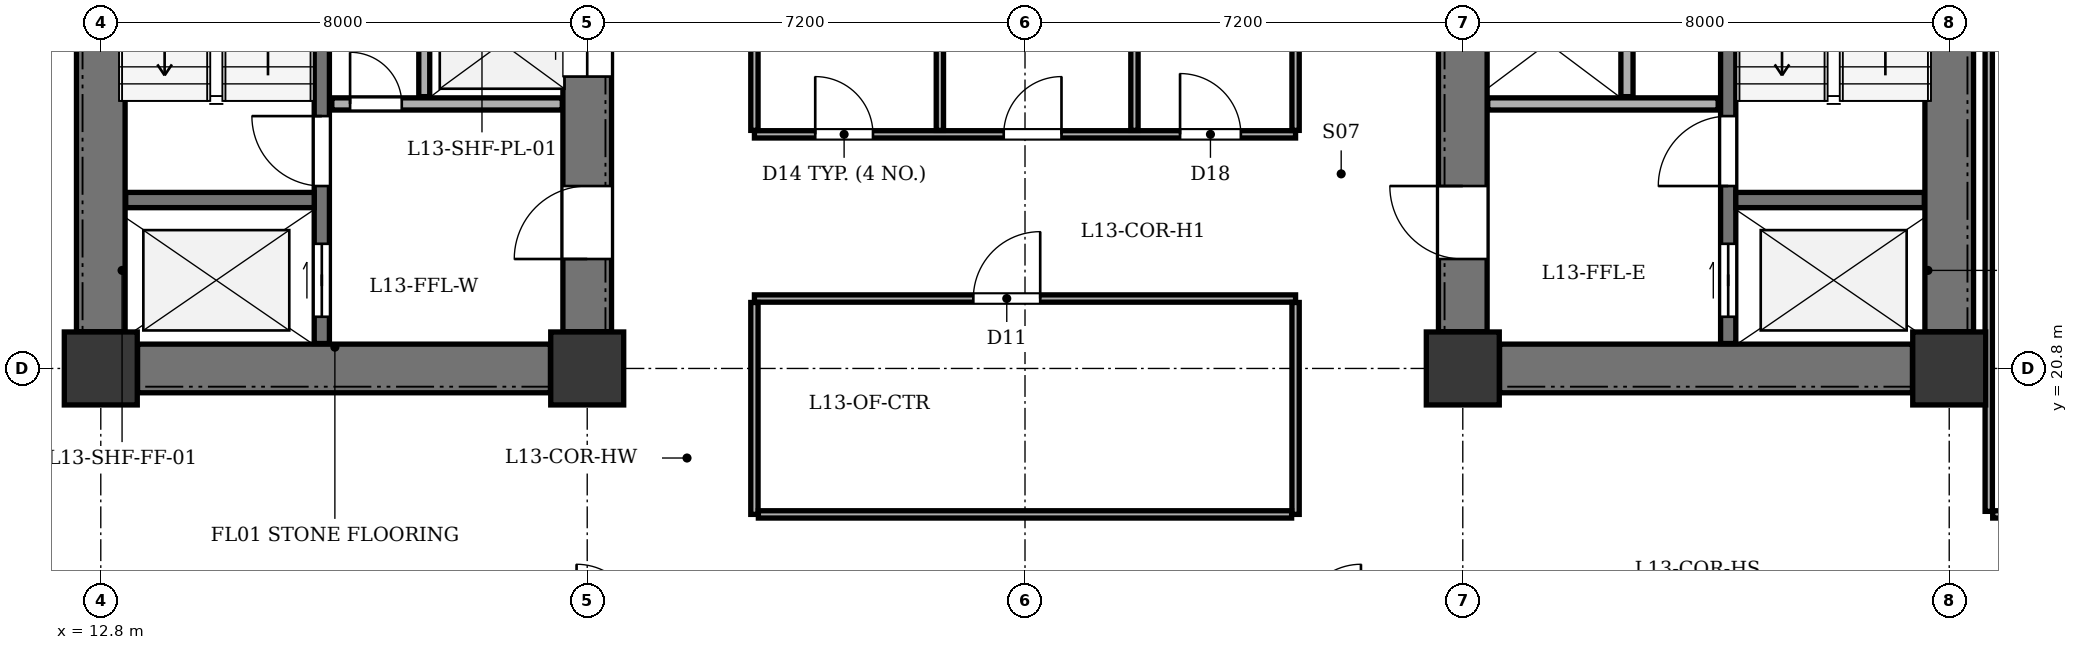
"""IFC4 building model, lengths in metres.
Left out: names, types, materials, properties, quantities, classifications, styles, units other than length and angle.
Written with IfcOpenShell. Run it as: python <this file> out.ifc"""

import sys

from ifc_helpers import new_model, si_unit, direction, frame, frame_2d, origin, origin_2d, place, context, subcontext, project, spatial, rectangle, extrude, element, fill, save


model = new_model("IFC4")
c1 = context("Model", 3, precision=1e-05, world=origin(), true_north=direction((0.0, 1.0)))
c2 = subcontext(c1, "Body", "Model", "MODEL_VIEW")
j1 = project(units=[si_unit("LENGTHUNIT", "METRE"), si_unit("PLANEANGLEUNIT", "RADIAN")], contexts=[c1])
p1 = place(None, origin())
s1 = spatial("IfcSite", under=j1, at=p1, CompositionType="ELEMENT")
p2 = place(p1, origin())
s2 = spatial("IfcBuilding", under=s1, at=p2, CompositionType="ELEMENT")
p3 = place(p2, frame((0.0, 0.0, 55.5)))
s3 = spatial("IfcBuildingStorey", under=s2, at=p3, CompositionType="ELEMENT", Elevation=55.5)
for number, where, z_axis, x_axis in (
    (1, (12.8, 20.8, 0.0), (0.0, 0.0, 1.0), (1.0, 0.0, 0.0)),
    (2, (20.8, 20.8, 0.0), (0.0, 0.0, 1.0), (1.0, 0.0, 0.0)),
    (3, (35.2, 20.8, 0.0), (0.0, 0.0, 1.0), (1.0, 0.0, 0.0)),
    (4, (43.2, 20.8, 0.0), (0.0, 0.0, 1.0), (1.0, 0.0, 0.0)),
):
    element("IfcColumn", number, at=place(p3, frame(where, z_axis=z_axis, x_axis=x_axis)), inside=s3, PredefinedType="COLUMN", context=c2, shape_type="SweptSolid", body=[
        extrude(rectangle(XDim=1.2, YDim=1.2, at=origin_2d()), origin(), (0.0, 0.0, 1.0), 3.9),
    ])
p4 = place(p3, frame((12.8, 21.405, 0.0), z_axis=(0.0, 0.0, 1.0), x_axis=(0.0, 1.0, 0.0)))
e5 = element("IfcWall", 5, at=p4, inside=s3, PredefinedType="SHEAR", context=c2, shape_type="SweptSolid", body=[
    extrude(rectangle(XDim=11.59, YDim=0.8, at=frame_2d((5.795, 0.0))), origin(), (0.0, 0.0, 1.0), 3.6),
])
p5 = place(p3, frame((13.405, 20.8, 0.0), z_axis=(0.0, 0.0, 1.0), x_axis=(1.0, 0.0, 0.0)))
e6 = element("IfcWall", 6, at=p5, inside=s3, PredefinedType="SHEAR", context=c2, shape_type="SweptSolid", body=[
    extrude(rectangle(XDim=6.79, YDim=0.8, at=frame_2d((3.395, 0.0))), origin(), (0.0, 0.0, 1.0), 3.6),
])
p6 = place(p3, frame((20.8, 21.405, 0.0), z_axis=(0.0, 0.0, 1.0), x_axis=(0.0, 1.0, 0.0)))
e7 = element("IfcWall", 7, at=p6, inside=s3, PredefinedType="SHEAR", context=c2, shape_type="SweptSolid", body=[
    extrude(rectangle(XDim=11.59, YDim=0.8, at=frame_2d((5.795, 0.0))), origin(), (0.0, 0.0, 1.0), 3.6),
])
p7 = place(p6, frame((1.195, 0.0, 0.0)))
e8 = element("IfcOpeningElement", 8, at=p7, cuts=e7, PredefinedType="OPENING", context=c2, shape_type="SweptSolid", body=[
    extrude(rectangle(XDim=1.2, YDim=2.15, at=frame_2d((0.6, 1.075))), frame((0.0, 0.41, 0.0), z_axis=(0.0, -1.0, 0.0), x_axis=(1.0, 0.0, 0.0)), (0.0, 0.0, 1.0), 0.82),
])
p8 = place(p6, frame((4.195, 0.0, 0.0)))
e9 = element("IfcOpeningElement", 9, at=p8, cuts=e7, PredefinedType="OPENING", context=c2, shape_type="SweptSolid", body=[
    extrude(rectangle(XDim=1.1, YDim=2.1, at=frame_2d((0.55, 1.05))), frame((0.0, 0.41, 0.0), z_axis=(0.0, -1.0, 0.0), x_axis=(1.0, 0.0, 0.0)), (0.0, 0.0, 1.0), 0.82),
])
p9 = place(p6, frame((6.145, 0.0, 0.0)))
e10 = element("IfcOpeningElement", 10, at=p9, cuts=e7, PredefinedType="OPENING", context=c2, shape_type="SweptSolid", body=[
    extrude(rectangle(XDim=1.1, YDim=2.1, at=frame_2d((0.55, 1.05))), frame((0.0, 0.41, 0.0), z_axis=(0.0, -1.0, 0.0), x_axis=(1.0, 0.0, 0.0)), (0.0, 0.0, 1.0), 0.82),
])
p10 = place(p6, frame((8.095, 0.0, 0.0)))
e11 = element("IfcOpeningElement", 11, at=p10, cuts=e7, PredefinedType="OPENING", context=c2, shape_type="SweptSolid", body=[
    extrude(rectangle(XDim=1.1, YDim=2.1, at=frame_2d((0.55, 1.05))), frame((0.0, 0.41, 0.0), z_axis=(0.0, -1.0, 0.0), x_axis=(1.0, 0.0, 0.0)), (0.0, 0.0, 1.0), 0.82),
])
p11 = place(p3, frame((16.435, 21.21, 0.0), z_axis=(0.0, 0.0, 1.0), x_axis=(0.0, 1.0, 0.0)))
e12 = element("IfcWall", 12, at=p11, inside=s3, PredefinedType="SHEAR", context=c2, shape_type="SweptSolid", body=[
    extrude(rectangle(XDim=11.98, YDim=0.25, at=frame_2d((5.99, 0.0))), origin(), (0.0, 0.0, 1.0), 3.6),
])
p12 = place(p11, frame((0.44, 0.0, 0.0)))
e13 = element("IfcOpeningElement", 13, at=p12, cuts=e12, PredefinedType="OPENING", context=c2, shape_type="SweptSolid", body=[
    extrude(rectangle(XDim=1.2, YDim=2.15, at=frame_2d((0.6, 1.075))), frame((0.0, 0.135, 0.0), z_axis=(0.0, -1.0, 0.0), x_axis=(1.0, 0.0, 0.0)), (0.0, 0.0, 1.0), 0.27),
])
p13 = place(p11, frame((2.59, 0.0, 0.0)))
e14 = element("IfcOpeningElement", 14, at=p13, cuts=e12, PredefinedType="OPENING", context=c2, shape_type="SweptSolid", body=[
    extrude(rectangle(XDim=1.15, YDim=2.15, at=frame_2d((0.575, 1.075))), frame((0.0, 0.135, 0.0), z_axis=(0.0, -1.0, 0.0), x_axis=(1.0, 0.0, 0.0)), (0.0, 0.0, 1.0), 0.27),
])
p14 = place(p3, frame((13.21, 23.57, 0.0), z_axis=(0.0, 0.0, 1.0), x_axis=(1.0, 0.0, 0.0)))
e15 = element("IfcWall", 15, at=p14, inside=s3, PredefinedType="SHEAR", context=c2, shape_type="SweptSolid", body=[
    extrude(rectangle(XDim=3.1, YDim=0.25, at=frame_2d((1.55, 0.0))), origin(), (0.0, 0.0, 1.0), 3.6),
])
p15 = place(p3, frame((16.6, 25.15, 0.0), z_axis=(0.0, 0.0, 1.0), x_axis=(1.0, 0.0, 0.0)))
e16 = element("IfcWall", 16, at=p15, inside=s3, PredefinedType="SOLIDWALL", context=c2, shape_type="SweptSolid", body=[
    extrude(rectangle(XDim=3.79, YDim=0.2, at=frame_2d((1.895, 0.0))), origin(), (0.0, 0.0, 1.0), 3.6),
])
p16 = place(p15, frame((0.3, 0.0, 0.0)))
e17 = element("IfcOpeningElement", 17, at=p16, cuts=e16, PredefinedType="OPENING", context=c2, shape_type="SweptSolid", body=[
    extrude(rectangle(XDim=0.85, YDim=2.02, at=frame_2d((0.425, 1.01))), frame((0.0, 0.11, 0.0), z_axis=(0.0, -1.0, 0.0), x_axis=(1.0, 0.0, 0.0)), (0.0, 0.0, 1.0), 0.22),
])
p17 = place(p3, frame((18.12, 25.27, 0.0), z_axis=(0.0, 0.0, 1.0), x_axis=(0.0, 1.0, 0.0)))
e18 = element("IfcWall", 18, at=p17, inside=s3, PredefinedType="PARTITIONING", context=c2, shape_type="SweptSolid", body=[
    extrude(rectangle(XDim=5.66, YDim=0.18, at=frame_2d((2.83, 0.0))), origin(), (0.0, 0.0, 1.0), 3.6),
])
p18 = place(p3, frame((43.2, 21.405, 0.0), z_axis=(0.0, 0.0, 1.0), x_axis=(0.0, 1.0, 0.0)))
e19 = element("IfcWall", 19, at=p18, inside=s3, PredefinedType="SHEAR", context=c2, shape_type="SweptSolid", body=[
    extrude(rectangle(XDim=11.59, YDim=0.8, at=frame_2d((5.795, 0.0))), origin(), (0.0, 0.0, 1.0), 3.6),
])
p19 = place(p3, frame((35.805, 20.8, 0.0), z_axis=(0.0, 0.0, 1.0), x_axis=(1.0, 0.0, 0.0)))
e20 = element("IfcWall", 20, at=p19, inside=s3, PredefinedType="SHEAR", context=c2, shape_type="SweptSolid", body=[
    extrude(rectangle(XDim=6.79, YDim=0.8, at=frame_2d((3.395, 0.0))), origin(), (0.0, 0.0, 1.0), 3.6),
])
p20 = place(p3, frame((35.2, 21.405, 0.0), z_axis=(0.0, 0.0, 1.0), x_axis=(0.0, 1.0, 0.0)))
e21 = element("IfcWall", 21, at=p20, inside=s3, PredefinedType="SHEAR", context=c2, shape_type="SweptSolid", body=[
    extrude(rectangle(XDim=11.59, YDim=0.8, at=frame_2d((5.795, 0.0))), origin(), (0.0, 0.0, 1.0), 3.6),
])
p21 = place(p20, frame((1.195, 0.0, 0.0)))
e22 = element("IfcOpeningElement", 22, at=p21, cuts=e21, PredefinedType="OPENING", context=c2, shape_type="SweptSolid", body=[
    extrude(rectangle(XDim=1.2, YDim=2.15, at=frame_2d((0.6, 1.075))), frame((0.0, 0.41, 0.0), z_axis=(0.0, -1.0, 0.0), x_axis=(1.0, 0.0, 0.0)), (0.0, 0.0, 1.0), 0.82),
])
p22 = place(p3, frame((39.565, 21.21, 0.0), z_axis=(0.0, 0.0, 1.0), x_axis=(0.0, 1.0, 0.0)))
e23 = element("IfcWall", 23, at=p22, inside=s3, PredefinedType="SHEAR", context=c2, shape_type="SweptSolid", body=[
    extrude(rectangle(XDim=11.98, YDim=0.25, at=frame_2d((5.99, 0.0))), origin(), (0.0, 0.0, 1.0), 3.6),
])
p23 = place(p22, frame((0.44, 0.0, 0.0)))
e24 = element("IfcOpeningElement", 24, at=p23, cuts=e23, PredefinedType="OPENING", context=c2, shape_type="SweptSolid", body=[
    extrude(rectangle(XDim=1.2, YDim=2.15, at=frame_2d((0.6, 1.075))), frame((0.0, 0.135, 0.0), z_axis=(0.0, -1.0, 0.0), x_axis=(1.0, 0.0, 0.0)), (0.0, 0.0, 1.0), 0.27),
])
p24 = place(p22, frame((2.59, 0.0, 0.0)))
e25 = element("IfcOpeningElement", 25, at=p24, cuts=e23, PredefinedType="OPENING", context=c2, shape_type="SweptSolid", body=[
    extrude(rectangle(XDim=1.15, YDim=2.15, at=frame_2d((0.575, 1.075))), frame((0.0, 0.135, 0.0), z_axis=(0.0, -1.0, 0.0), x_axis=(1.0, 0.0, 0.0)), (0.0, 0.0, 1.0), 0.27),
])
p25 = place(p3, frame((39.69, 23.57, 0.0), z_axis=(0.0, 0.0, 1.0), x_axis=(1.0, 0.0, 0.0)))
e26 = element("IfcWall", 26, at=p25, inside=s3, PredefinedType="SHEAR", context=c2, shape_type="SweptSolid", body=[
    extrude(rectangle(XDim=3.1, YDim=0.25, at=frame_2d((1.55, 0.0))), origin(), (0.0, 0.0, 1.0), 3.6),
])
p26 = place(p3, frame((35.61, 25.15, 0.0), z_axis=(0.0, 0.0, 1.0), x_axis=(1.0, 0.0, 0.0)))
e27 = element("IfcWall", 27, at=p26, inside=s3, PredefinedType="SOLIDWALL", context=c2, shape_type="SweptSolid", body=[
    extrude(rectangle(XDim=3.79, YDim=0.2, at=frame_2d((1.895, 0.0))), origin(), (0.0, 0.0, 1.0), 3.6),
])
p27 = place(p3, frame((37.9, 25.27, 0.0), z_axis=(0.0, 0.0, 1.0), x_axis=(0.0, 1.0, 0.0)))
e28 = element("IfcWall", 28, at=p27, inside=s3, PredefinedType="SOLIDWALL", context=c2, shape_type="SweptSolid", body=[
    extrude(rectangle(XDim=7.92, YDim=0.2, at=frame_2d((3.96, 0.0))), origin(), (0.0, 0.0, 1.0), 3.6),
])
p28 = place(p3, frame((23.55, 24.65, 0.0), z_axis=(0.0, 0.0, 1.0), x_axis=(1.0, 0.0, 0.0)))
e29 = element("IfcWall", 29, at=p28, inside=s3, PredefinedType="PARTITIONING", context=c2, shape_type="SweptSolid", body=[
    extrude(rectangle(XDim=8.9, YDim=0.12, at=frame_2d((4.45, 0.0))), origin(), (0.0, 0.0, 1.0), 3.135),
])
p29 = place(p28, frame((1.0, 0.0, 0.0)))
e30 = element("IfcOpeningElement", 30, at=p29, cuts=e29, PredefinedType="OPENING", context=c2, shape_type="SweptSolid", body=[
    extrude(rectangle(XDim=0.95, YDim=2.1, at=frame_2d((0.475, 1.05))), frame((0.0, 0.07, 0.0), z_axis=(0.0, -1.0, 0.0), x_axis=(1.0, 0.0, 0.0)), (0.0, 0.0, 1.0), 0.14),
])
p30 = place(p28, frame((4.1, 0.0, 0.0)))
e31 = element("IfcOpeningElement", 31, at=p30, cuts=e29, PredefinedType="OPENING", context=c2, shape_type="SweptSolid", body=[
    extrude(rectangle(XDim=0.95, YDim=2.1, at=frame_2d((0.475, 1.05))), frame((0.0, 0.07, 0.0), z_axis=(0.0, -1.0, 0.0), x_axis=(1.0, 0.0, 0.0)), (0.0, 0.0, 1.0), 0.14),
])
p31 = place(p28, frame((7.0, 0.0, 0.0)))
e32 = element("IfcOpeningElement", 32, at=p31, cuts=e29, PredefinedType="OPENING", context=c2, shape_type="SweptSolid", body=[
    extrude(rectangle(XDim=1.0, YDim=2.1, at=frame_2d((0.5, 1.05))), frame((0.0, 0.07, 0.0), z_axis=(0.0, -1.0, 0.0), x_axis=(1.0, 0.0, 0.0)), (0.0, 0.0, 1.0), 0.14),
])
for number, where, z_axis, x_axis in (
    (33, (23.55, 24.715, 0.0), (0.0, 0.0, 1.0), (0.0, 1.0, 0.0)),
    (34, (32.45, 24.715, 0.0), (0.0, 0.0, 1.0), (0.0, 1.0, 0.0)),
    (35, (26.6, 24.715, 0.0), (0.0, 0.0, 1.0), (0.0, 1.0, 0.0)),
):
    element("IfcWall", number, at=place(p3, frame(where, z_axis=z_axis, x_axis=x_axis)), inside=s3, PredefinedType="PARTITIONING", context=c2, shape_type="SweptSolid", body=[
        extrude(rectangle(XDim=11.285, YDim=0.12, at=frame_2d((5.643, 0.0))), origin(), (0.0, 0.0, 1.0), 3.6),
    ])
p32 = place(p3, frame((29.8, 24.715, 0.0), z_axis=(0.0, 0.0, 1.0), x_axis=(0.0, 1.0, 0.0)))
e36 = element("IfcWall", 36, at=p32, inside=s3, PredefinedType="PARTITIONING", context=c2, shape_type="SweptSolid", body=[
    extrude(rectangle(XDim=11.285, YDim=0.12, at=frame_2d((5.643, 0.0))), origin(), (0.0, 0.0, 1.0), 3.135),
])
p33 = place(p3, frame((23.55, 21.95, 0.0), z_axis=(0.0, 0.0, 1.0), x_axis=(1.0, 0.0, 0.0)))
e37 = element("IfcWall", 37, at=p33, inside=s3, PredefinedType="PARTITIONING", context=c2, shape_type="SweptSolid", body=[
    extrude(rectangle(XDim=8.9, YDim=0.12, at=frame_2d((4.45, 0.0))), origin(), (0.0, 0.0, 1.0), 3.135),
])
p34 = place(p33, frame((3.6, 0.0, 0.0)))
e38 = element("IfcOpeningElement", 38, at=p34, cuts=e37, PredefinedType="OPENING", context=c2, shape_type="SweptSolid", body=[
    extrude(rectangle(XDim=1.1, YDim=2.15, at=frame_2d((0.55, 1.075))), frame((0.0, 0.07, 0.0), z_axis=(0.0, -1.0, 0.0), x_axis=(1.0, 0.0, 0.0)), (0.0, 0.0, 1.0), 0.14),
])
for number, where, z_axis, x_axis in (
    (39, (23.55, 18.4, 0.0), (0.0, 0.0, 1.0), (0.0, 1.0, 0.0)),
    (40, (32.45, 18.4, 0.0), (0.0, 0.0, 1.0), (0.0, 1.0, 0.0)),
):
    element("IfcWall", number, at=place(p3, frame(where, z_axis=z_axis, x_axis=x_axis)), inside=s3, PredefinedType="PARTITIONING", context=c2, shape_type="SweptSolid", body=[
        extrude(rectangle(XDim=3.485, YDim=0.12, at=frame_2d((1.743, 0.0))), origin(), (0.0, 0.0, 1.0), 3.6),
    ])
p35 = place(p3, frame((23.615, 18.4, 0.0), z_axis=(0.0, 0.0, 1.0), x_axis=(1.0, 0.0, 0.0)))
e41 = element("IfcWall", 41, at=p35, inside=s3, PredefinedType="PARTITIONING", context=c2, shape_type="SweptSolid", body=[
    extrude(rectangle(XDim=8.77, YDim=0.12, at=frame_2d((4.385, 0.0))), origin(), (0.0, 0.0, 1.0), 3.6),
])
p36 = place(p3, frame((43.85, 18.45, 0.0), z_axis=(0.0, 0.0, 1.0), x_axis=(0.0, 1.0, 0.0)))
e42 = element("IfcWall", 42, at=p36, inside=s3, PredefinedType="PARTITIONING", context=c2, shape_type="SweptSolid", body=[
    extrude(rectangle(XDim=17.5, YDim=0.12, at=frame_2d((8.75, 0.0))), origin(), (0.0, 0.0, 1.0), 3.6),
])
p37 = place(p3, frame((43.915, 18.4, 0.0), z_axis=(0.0, 0.0, 1.0), x_axis=(1.0, 0.0, 0.0)))
e43 = element("IfcWall", 43, at=p37, inside=s3, PredefinedType="PARTITIONING", context=c2, shape_type="SweptSolid", body=[
    extrude(rectangle(XDim=11.38, YDim=0.12, at=frame_2d((5.69, 0.0))), origin(), (0.0, 0.0, 1.0), 3.6),
])
p38 = place(p37, frame((1.485, 0.0, 0.0)))
e44 = element("IfcOpeningElement", 44, at=p38, cuts=e43, PredefinedType="OPENING", context=c2, shape_type="SweptSolid", body=[
    extrude(rectangle(XDim=0.95, YDim=2.1, at=frame_2d((0.475, 1.05))), frame((0.0, 0.07, 0.0), z_axis=(0.0, -1.0, 0.0), x_axis=(1.0, 0.0, 0.0)), (0.0, 0.0, 1.0), 0.14),
])
p39 = place(p7, origin())
e45 = element("IfcDoor", 45, at=p39, inside=s3, OperationType="SINGLE_SWING_LEFT", PredefinedType="DOOR", context=c2, shape_type="SweptSolid", body=[
    extrude(rectangle(XDim=1.2, YDim=2.15, at=frame_2d((0.6, 1.075))), frame((0.0, 0.025, 0.0), z_axis=(0.0, -1.0, 0.0), x_axis=(1.0, 0.0, 0.0)), (0.0, 0.0, 1.0), 0.05),
])
fill(e8, e45)
p40 = place(p8, origin())
e46 = element("IfcDoor", 46, at=p40, inside=s3, OperationType="DOUBLE_DOOR_SLIDING", PredefinedType="DOOR", context=c2, shape_type="SweptSolid", body=[
    extrude(rectangle(XDim=1.1, YDim=2.1, at=frame_2d((0.55, 1.05))), frame((0.0, 0.025, 0.0), z_axis=(0.0, -1.0, 0.0), x_axis=(1.0, 0.0, 0.0)), (0.0, 0.0, 1.0), 0.05),
])
fill(e9, e46)
p41 = place(p12, origin())
e47 = element("IfcDoor", 47, at=p41, inside=s3, OperationType="DOUBLE_DOOR_SLIDING", PredefinedType="DOOR", context=c2, shape_type="SweptSolid", body=[
    extrude(rectangle(XDim=1.2, YDim=2.15, at=frame_2d((0.6, 1.075))), frame((0.0, 0.025, 0.0), z_axis=(0.0, -1.0, 0.0), x_axis=(1.0, 0.0, 0.0)), (0.0, 0.0, 1.0), 0.05),
])
fill(e13, e47)
p42 = place(p13, origin())
e48 = element("IfcDoor", 48, at=p42, inside=s3, OperationType="SINGLE_SWING_RIGHT", PredefinedType="DOOR", context=c2, shape_type="SweptSolid", body=[
    extrude(rectangle(XDim=1.15, YDim=2.15, at=frame_2d((0.575, 1.075))), frame((0.0, 0.025, 0.0), z_axis=(0.0, -1.0, 0.0), x_axis=(1.0, 0.0, 0.0)), (0.0, 0.0, 1.0), 0.05),
])
fill(e14, e48)
p43 = place(p16, origin())
e49 = element("IfcDoor", 49, at=p43, inside=s3, OperationType="SINGLE_SWING_LEFT", PredefinedType="DOOR", context=c2, shape_type="SweptSolid", body=[
    extrude(rectangle(XDim=0.85, YDim=2.02, at=frame_2d((0.425, 1.01))), frame((0.0, 0.025, 0.0), z_axis=(0.0, -1.0, 0.0), x_axis=(1.0, 0.0, 0.0)), (0.0, 0.0, 1.0), 0.05),
])
fill(e17, e49)
p44 = place(p21, origin())
e50 = element("IfcDoor", 50, at=p44, inside=s3, OperationType="SINGLE_SWING_RIGHT", PredefinedType="DOOR", context=c2, shape_type="SweptSolid", body=[
    extrude(rectangle(XDim=1.2, YDim=2.15, at=frame_2d((0.6, 1.075))), frame((0.0, 0.025, 0.0), z_axis=(0.0, -1.0, 0.0), x_axis=(1.0, 0.0, 0.0)), (0.0, 0.0, 1.0), 0.05),
])
fill(e22, e50)
p45 = place(p23, origin())
e51 = element("IfcDoor", 51, at=p45, inside=s3, OperationType="DOUBLE_DOOR_SLIDING", PredefinedType="DOOR", context=c2, shape_type="SweptSolid", body=[
    extrude(rectangle(XDim=1.2, YDim=2.15, at=frame_2d((0.6, 1.075))), frame((0.0, 0.025, 0.0), z_axis=(0.0, -1.0, 0.0), x_axis=(1.0, 0.0, 0.0)), (0.0, 0.0, 1.0), 0.05),
])
fill(e24, e51)
p46 = place(p24, origin())
e52 = element("IfcDoor", 52, at=p46, inside=s3, OperationType="SINGLE_SWING_LEFT", PredefinedType="DOOR", context=c2, shape_type="SweptSolid", body=[
    extrude(rectangle(XDim=1.15, YDim=2.15, at=frame_2d((0.575, 1.075))), frame((0.0, 0.025, 0.0), z_axis=(0.0, -1.0, 0.0), x_axis=(1.0, 0.0, 0.0)), (0.0, 0.0, 1.0), 0.05),
])
fill(e25, e52)
p47 = place(p29, origin())
e53 = element("IfcDoor", 53, at=p47, inside=s3, OperationType="SINGLE_SWING_LEFT", PredefinedType="DOOR", context=c2, shape_type="SweptSolid", body=[
    extrude(rectangle(XDim=0.95, YDim=2.1, at=frame_2d((0.475, 1.05))), frame((0.0, 0.025, 0.0), z_axis=(0.0, -1.0, 0.0), x_axis=(1.0, 0.0, 0.0)), (0.0, 0.0, 1.0), 0.05),
])
fill(e30, e53)
p48 = place(p30, origin())
e54 = element("IfcDoor", 54, at=p48, inside=s3, OperationType="SINGLE_SWING_RIGHT", PredefinedType="DOOR", context=c2, shape_type="SweptSolid", body=[
    extrude(rectangle(XDim=0.95, YDim=2.1, at=frame_2d((0.475, 1.05))), frame((0.0, 0.025, 0.0), z_axis=(0.0, -1.0, 0.0), x_axis=(1.0, 0.0, 0.0)), (0.0, 0.0, 1.0), 0.05),
])
fill(e31, e54)
p49 = place(p31, origin())
e55 = element("IfcDoor", 55, at=p49, inside=s3, OperationType="SINGLE_SWING_LEFT", PredefinedType="DOOR", context=c2, shape_type="SweptSolid", body=[
    extrude(rectangle(XDim=1.0, YDim=2.1, at=frame_2d((0.5, 1.05))), frame((0.0, 0.025, 0.0), z_axis=(0.0, -1.0, 0.0), x_axis=(1.0, 0.0, 0.0)), (0.0, 0.0, 1.0), 0.05),
])
fill(e32, e55)
p50 = place(p34, origin())
e56 = element("IfcDoor", 56, at=p50, inside=s3, OperationType="SINGLE_SWING_RIGHT", PredefinedType="DOOR", context=c2, shape_type="SweptSolid", body=[
    extrude(rectangle(XDim=1.1, YDim=2.15, at=frame_2d((0.55, 1.075))), frame((0.0, 0.025, 0.0), z_axis=(0.0, -1.0, 0.0), x_axis=(1.0, 0.0, 0.0)), (0.0, 0.0, 1.0), 0.05),
])
fill(e38, e56)
save(model, sys.argv[1])
